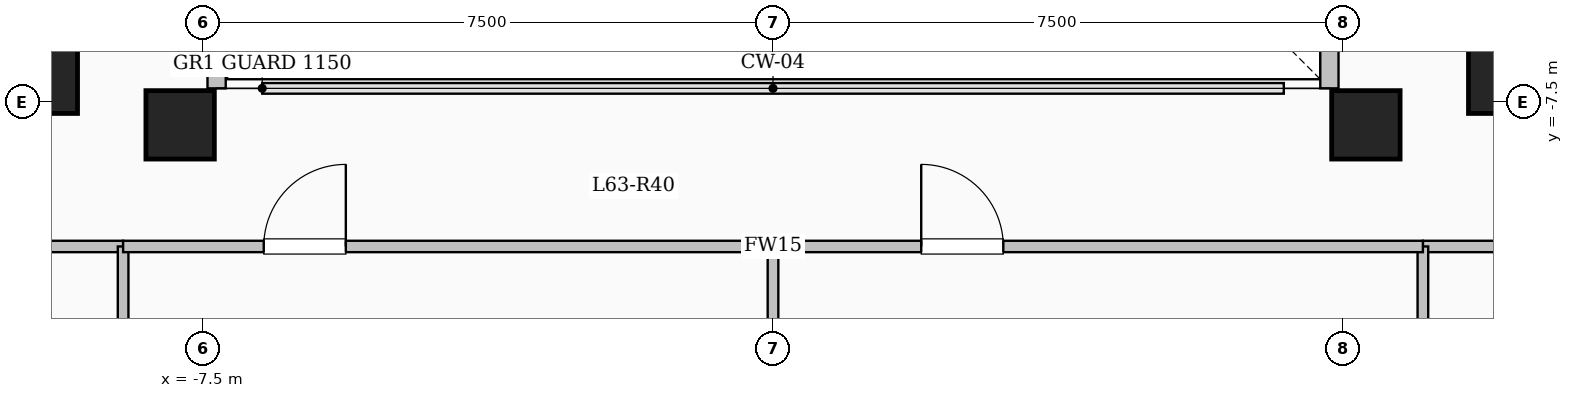
"""IFC4 building model, lengths in metres.
Left out: names, types, materials, properties, quantities, classifications, styles, units other than length and angle.
Written with IfcOpenShell. Run it as: python <this file> out.ifc"""

import sys

from ifc_helpers import new_model, si_unit, direction, frame, frame_2d, origin, origin_2d, place, context, subcontext, project, spatial, rectangle, extrude, element, fill, save


model = new_model("IFC4")
c1 = context("Model", 3, precision=1e-05, world=origin(), true_north=direction((0.0, 1.0)))
c2 = subcontext(c1, "Body", "Model", "MODEL_VIEW")
j1 = project(units=[si_unit("LENGTHUNIT", "METRE"), si_unit("PLANEANGLEUNIT", "RADIAN")], contexts=[c1])
p1 = place(None, origin())
s1 = spatial("IfcSite", under=j1, at=p1, CompositionType="ELEMENT")
p2 = place(p1, origin())
s2 = spatial("IfcBuilding", under=s1, at=p2, CompositionType="ELEMENT")
p3 = place(p2, frame((0.0, 0.0, 231.75)))
s3 = spatial("IfcBuildingStorey", under=s2, at=p3, CompositionType="ELEMENT", Elevation=231.75)
for number, where, z_axis, x_axis in (
    (1, (-7.8, -7.8, 0.0), (0.0, 0.0, 1.0), (1.0, 0.0, 0.0)),
    (2, (7.8, -7.8, 0.0), (0.0, 0.0, 1.0), (1.0, 0.0, 0.0)),
    (3, (-9.6, -7.2, 0.0), (0.0, 0.0, 1.0), (1.0, 0.0, 0.0)),
    (4, (9.6, -7.2, 0.0), (0.0, 0.0, 1.0), (1.0, 0.0, 0.0)),
):
    element("IfcColumn", number, at=place(p3, frame(where, z_axis=z_axis, x_axis=x_axis)), inside=s3, PredefinedType="COLUMN", context=c2, shape_type="SweptSolid", body=[
        extrude(rectangle(XDim=0.9, YDim=0.9, at=origin_2d()), origin(), (0.0, 0.0, 1.0), 4.65),
    ])
p4 = place(p3, frame((7.32, -7.32, 0.0), z_axis=(0.0, 0.0, 1.0), x_axis=(0.0, 1.0, 0.0)))
e5 = element("IfcWall", 5, at=p4, inside=s3, PredefinedType="SOLIDWALL", context=c2, shape_type="SweptSolid", body=[
    extrude(rectangle(XDim=14.64, YDim=0.24, at=frame_2d((7.32, 0.0))), origin(), (0.0, 0.0, 1.0), 4.35),
])
p5 = place(p4, frame((6.62, 0.0, 0.95)))
e6 = element("IfcOpeningElement", 6, at=p5, cuts=e5, PredefinedType="OPENING", context=c2, shape_type="SweptSolid", body=[
    extrude(rectangle(XDim=1.4, YDim=1.5, at=frame_2d((0.7, 0.75))), frame((0.0, 0.13, 0.0), z_axis=(0.0, -1.0, 0.0), x_axis=(1.0, 0.0, 0.0)), (0.0, 0.0, 1.0), 0.26),
])
p6 = place(p3, frame((-7.32, 7.32, 0.0), z_axis=(0.0, 0.0, 1.0), x_axis=(0.0, -1.0, 0.0)))
e7 = element("IfcWall", 7, at=p6, inside=s3, PredefinedType="SOLIDWALL", context=c2, shape_type="SweptSolid", body=[
    extrude(rectangle(XDim=14.64, YDim=0.24, at=frame_2d((7.32, 0.0))), origin(), (0.0, 0.0, 1.0), 4.35),
])
p7 = place(p6, frame((6.62, 0.0, 0.95)))
e8 = element("IfcOpeningElement", 8, at=p7, cuts=e7, PredefinedType="OPENING", context=c2, shape_type="SweptSolid", body=[
    extrude(rectangle(XDim=1.4, YDim=1.5, at=frame_2d((0.7, 0.75))), frame((0.0, 0.13, 0.0), z_axis=(0.0, -1.0, 0.0), x_axis=(1.0, 0.0, 0.0)), (0.0, 0.0, 1.0), 0.26),
])
p8 = place(p3, frame((-18.35, -9.4, 0.0), z_axis=(0.0, 0.0, 1.0), x_axis=(1.0, 0.0, 0.0)))
e9 = element("IfcWall", 9, at=p8, inside=s3, PredefinedType="PARTITIONING", context=c2, shape_type="SweptSolid", body=[
    extrude(rectangle(XDim=9.8, YDim=0.15, at=frame_2d((4.9, 0.0))), origin(), (0.0, 0.0, 1.0), 4.35),
])
p9 = place(p8, frame((1.1, 0.0, 0.0)))
e10 = element("IfcOpeningElement", 10, at=p9, cuts=e9, PredefinedType="OPENING", context=c2, shape_type="SweptSolid", body=[
    extrude(rectangle(XDim=1.08, YDim=2.15, at=frame_2d((0.54, 1.075))), frame((0.0, 0.085, 0.0), z_axis=(0.0, -1.0, 0.0), x_axis=(1.0, 0.0, 0.0)), (0.0, 0.0, 1.0), 0.17),
])
p10 = place(p8, frame((6.36, 0.0, 0.0)))
e11 = element("IfcOpeningElement", 11, at=p10, cuts=e9, PredefinedType="OPENING", context=c2, shape_type="SweptSolid", body=[
    extrude(rectangle(XDim=1.08, YDim=2.15, at=frame_2d((0.54, 1.075))), frame((0.0, 0.085, 0.0), z_axis=(0.0, -1.0, 0.0), x_axis=(1.0, 0.0, 0.0)), (0.0, 0.0, 1.0), 0.17),
])
p11 = place(p3, frame((8.55, -9.4, 0.0), z_axis=(0.0, 0.0, 1.0), x_axis=(1.0, 0.0, 0.0)))
e12 = element("IfcWall", 12, at=p11, inside=s3, PredefinedType="PARTITIONING", context=c2, shape_type="SweptSolid", body=[
    extrude(rectangle(XDim=9.8, YDim=0.15, at=frame_2d((4.9, 0.0))), origin(), (0.0, 0.0, 1.0), 4.35),
])
p12 = place(p11, frame((1.1, 0.0, 0.0)))
e13 = element("IfcOpeningElement", 13, at=p12, cuts=e12, PredefinedType="OPENING", context=c2, shape_type="SweptSolid", body=[
    extrude(rectangle(XDim=1.08, YDim=2.15, at=frame_2d((0.54, 1.075))), frame((0.0, 0.085, 0.0), z_axis=(0.0, -1.0, 0.0), x_axis=(1.0, 0.0, 0.0)), (0.0, 0.0, 1.0), 0.17),
])
p13 = place(p11, frame((5.925, 0.0, 0.0)))
e14 = element("IfcOpeningElement", 14, at=p13, cuts=e12, PredefinedType="OPENING", context=c2, shape_type="SweptSolid", body=[
    extrude(rectangle(XDim=1.2, YDim=2.15, at=frame_2d((0.6, 1.075))), frame((0.0, 0.085, 0.0), z_axis=(0.0, -1.0, 0.0), x_axis=(1.0, 0.0, 0.0)), (0.0, 0.0, 1.0), 0.17),
])
for number, where, z_axis, x_axis in (
    (15, (-8.55, -21.504, 0.0), (0.0, 0.0, 1.0), (0.0, 1.0, 0.0)),
    (16, (8.55, -21.504, 0.0), (0.0, 0.0, 1.0), (0.0, 1.0, 0.0)),
):
    element("IfcWall", number, at=place(p3, frame(where, z_axis=z_axis, x_axis=x_axis)), inside=s3, PredefinedType="PARTITIONING", context=c2, shape_type="SweptSolid", body=[
        extrude(rectangle(XDim=12.104, YDim=0.14, at=frame_2d((6.052, 0.0))), origin(), (0.0, 0.0, 1.0), 4.35),
    ])
p14 = place(p3, frame((-8.55, -9.4, 0.0), z_axis=(0.0, 0.0, 1.0), x_axis=(1.0, 0.0, 0.0)))
e17 = element("IfcWall", 17, at=p14, inside=s3, PredefinedType="PARTITIONING", context=c2, shape_type="SweptSolid", body=[
    extrude(rectangle(XDim=17.1, YDim=0.15, at=frame_2d((8.55, 0.0))), origin(), (0.0, 0.0, 1.0), 4.35),
])
p15 = place(p14, frame((1.85, 0.0, 0.0)))
e18 = element("IfcOpeningElement", 18, at=p15, cuts=e17, PredefinedType="OPENING", context=c2, shape_type="SweptSolid", body=[
    extrude(rectangle(XDim=1.08, YDim=2.15, at=frame_2d((0.54, 1.075))), frame((0.0, 0.085, 0.0), z_axis=(0.0, -1.0, 0.0), x_axis=(1.0, 0.0, 0.0)), (0.0, 0.0, 1.0), 0.17),
])
p16 = place(p14, frame((10.5, 0.0, 0.0)))
e19 = element("IfcOpeningElement", 19, at=p16, cuts=e17, PredefinedType="OPENING", context=c2, shape_type="SweptSolid", body=[
    extrude(rectangle(XDim=1.08, YDim=2.15, at=frame_2d((0.54, 1.075))), frame((0.0, 0.085, 0.0), z_axis=(0.0, -1.0, 0.0), x_axis=(1.0, 0.0, 0.0)), (0.0, 0.0, 1.0), 0.17),
])
p17 = place(p3, frame((0.0, -22.38, 0.0), z_axis=(0.0, 0.0, 1.0), x_axis=(0.0, 1.0, 0.0)))
e20 = element("IfcWall", 20, at=p17, inside=s3, PredefinedType="PARTITIONING", context=c2, shape_type="SweptSolid", body=[
    extrude(rectangle(XDim=12.98, YDim=0.14, at=frame_2d((6.49, 0.0))), origin(), (0.0, 0.0, 1.0), 4.35),
])
p18 = place(p15, origin())
e21 = element("IfcDoor", 21, at=p18, inside=s3, OperationType="SINGLE_SWING_RIGHT", PredefinedType="DOOR", context=c2, shape_type="SweptSolid", body=[
    extrude(rectangle(XDim=1.08, YDim=2.15, at=frame_2d((0.54, 1.075))), frame((0.0, 0.025, 0.0), z_axis=(0.0, -1.0, 0.0), x_axis=(1.0, 0.0, 0.0)), (0.0, 0.0, 1.0), 0.05),
])
fill(e18, e21)
p19 = place(p16, origin())
e22 = element("IfcDoor", 22, at=p19, inside=s3, OperationType="SINGLE_SWING_LEFT", PredefinedType="DOOR", context=c2, shape_type="SweptSolid", body=[
    extrude(rectangle(XDim=1.08, YDim=2.15, at=frame_2d((0.54, 1.075))), frame((0.0, 0.025, 0.0), z_axis=(0.0, -1.0, 0.0), x_axis=(1.0, 0.0, 0.0)), (0.0, 0.0, 1.0), 0.05),
])
fill(e19, e22)
save(model, sys.argv[1])
